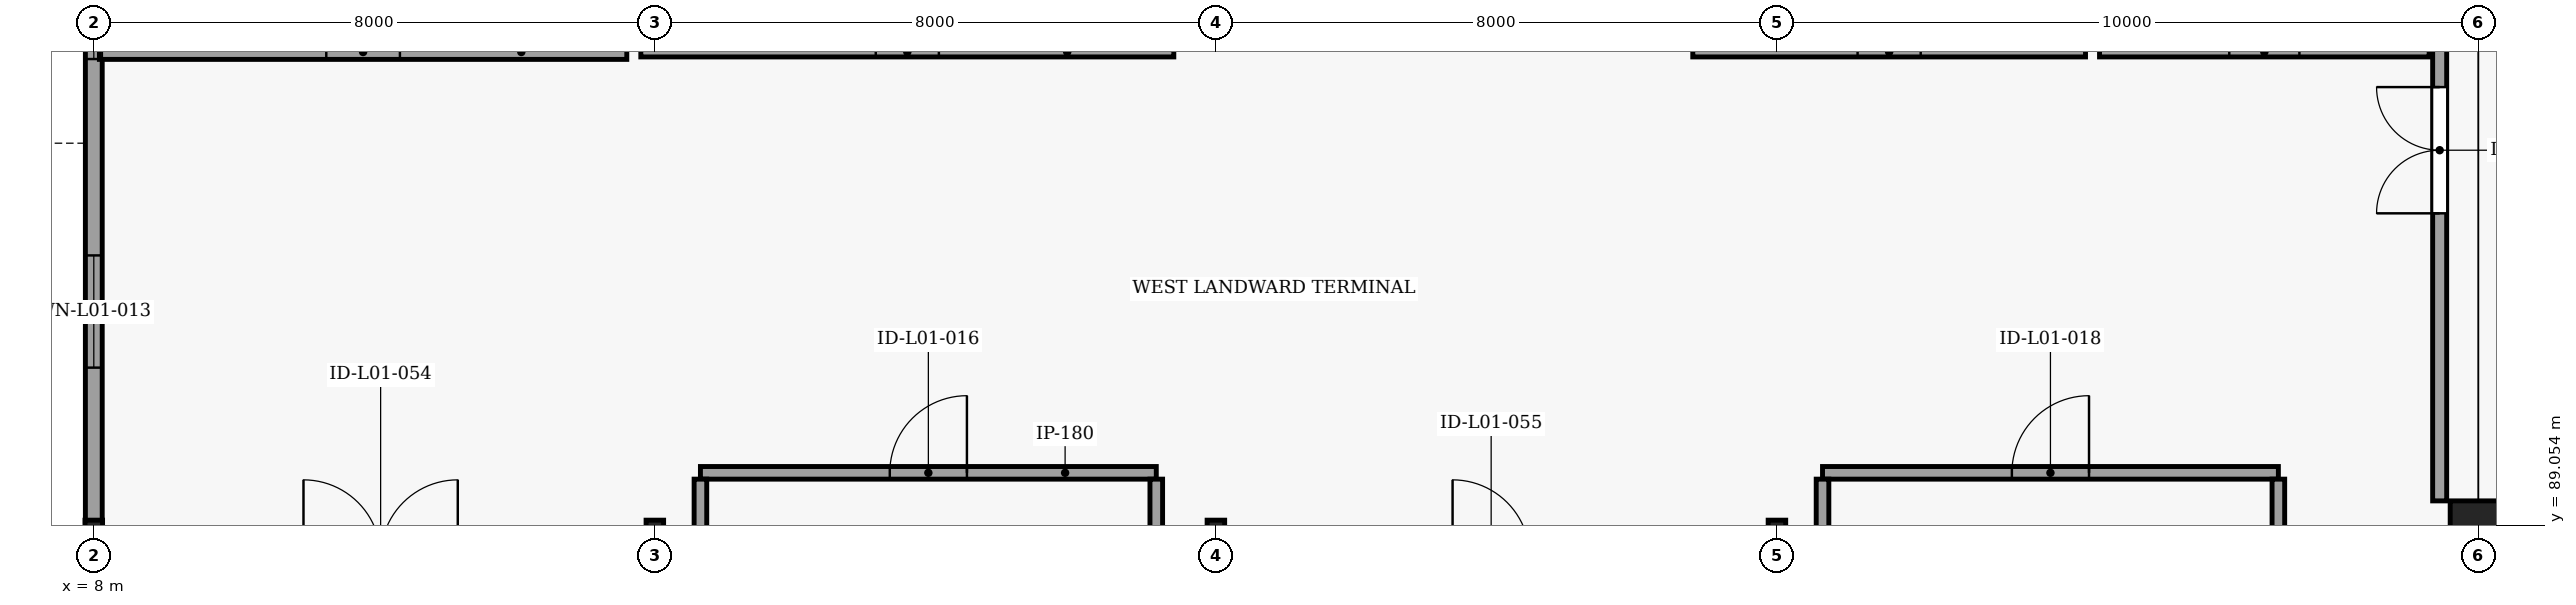
"""IFC4 building model, lengths in metres.
Left out: names, types, materials, properties, quantities, classifications, styles, units other than length and angle.
Written with IfcOpenShell. Run it as: python <this file> out.ifc"""

import sys

from ifc_helpers import new_model, si_unit, direction, frame, frame_2d, origin, origin_2d, place, context, subcontext, project, spatial, rectangle, hollow_rectangle, extrude, element, fill, save


model = new_model("IFC4")
c1 = context("Model", 3, precision=1e-05, world=origin(), true_north=direction((0.0, 1.0)))
c2 = subcontext(c1, "Body", "Model", "MODEL_VIEW")
j1 = project(units=[si_unit("LENGTHUNIT", "METRE"), si_unit("PLANEANGLEUNIT", "RADIAN")], contexts=[c1])
p1 = place(None, origin())
s1 = spatial("IfcSite", under=j1, at=p1, CompositionType="ELEMENT")
p2 = place(p1, origin())
s2 = spatial("IfcBuilding", under=s1, at=p2, CompositionType="ELEMENT")
p3 = place(p2, origin())
s3 = spatial("IfcBuildingStorey", under=s2, at=p3, CompositionType="ELEMENT", Elevation=0.0)
for number, where, z_axis, x_axis in (
    (1, (8.0, 89.0, -0.45), (0.0, 0.0, 1.0), (1.0, 0.0, 0.0)),
    (2, (16.0, 89.0, -0.45), (0.0, 0.0, 1.0), (1.0, 0.0, 0.0)),
    (3, (24.0, 89.0, -0.45), (0.0, 0.0, 1.0), (1.0, 0.0, 0.0)),
    (4, (32.0, 89.0, -0.45), (0.0, 0.0, 1.0), (1.0, 0.0, 0.0)),
):
    element("IfcColumn", number, at=place(p3, frame(where, z_axis=z_axis, x_axis=x_axis)), inside=s3, PredefinedType="COLUMN", context=c2, shape_type="SweptSolid", body=[
        extrude(hollow_rectangle(XDim=0.25, YDim=0.25, WallThickness=0.012, InnerFilletRadius=0.012, OuterFilletRadius=0.025, at=origin_2d()), origin(), (0.0, 0.0, 1.0), 5.57),
    ])
p4 = place(p3, frame((42.0, 89.0, -0.45), z_axis=(0.0, 0.0, 1.0), x_axis=(1.0, 0.0, 0.0)))
e5 = element("IfcColumn", 5, at=p4, inside=s3, PredefinedType="COLUMN", context=c2, shape_type="SweptSolid", body=[
    extrude(rectangle(XDim=0.8, YDim=0.8, at=origin_2d()), origin(), (0.0, 0.0, 1.0), 5.57),
])
p5 = place(p3, frame((8.0, 78.3, 0.0), z_axis=(0.0, 0.0, 1.0), x_axis=(0.0, 1.0, 0.0)))
e6 = element("IfcWall", 6, at=p5, inside=s3, PredefinedType="ELEMENTEDWALL", context=c2, shape_type="SweptSolid", body=[
    extrude(rectangle(XDim=10.822, YDim=0.24, at=frame_2d((5.411, 0.0))), origin(), (0.0, 0.0, 1.0), 4.694),
])
p6 = place(p5, frame((2.0, 0.0, 1.1)))
e7 = element("IfcOpeningElement", 7, at=p6, cuts=e6, PredefinedType="OPENING", context=c2, shape_type="SweptSolid", body=[
    extrude(rectangle(XDim=1.6, YDim=1.3, at=frame_2d((0.8, 0.65))), frame((0.0, 0.13, 0.0), z_axis=(0.0, -1.0, 0.0), x_axis=(1.0, 0.0, 0.0)), (0.0, 0.0, 1.0), 0.26),
])
p7 = place(p5, frame((6.4, 0.0, 1.1)))
e8 = element("IfcOpeningElement", 8, at=p7, cuts=e6, PredefinedType="OPENING", context=c2, shape_type="SweptSolid", body=[
    extrude(rectangle(XDim=1.55, YDim=1.35, at=frame_2d((0.775, 0.675))), frame((0.0, 0.13, 0.0), z_axis=(0.0, -1.0, 0.0), x_axis=(1.0, 0.0, 0.0)), (0.0, 0.0, 1.0), 0.26),
])
p8 = place(p3, frame((8.0, 89.11, 0.0), z_axis=(0.0, 0.0, 1.0), x_axis=(0.0, 1.0, 0.0)))
e9 = element("IfcWall", 9, at=p8, inside=s3, PredefinedType="ELEMENTEDWALL", context=c2, shape_type="SweptSolid", body=[
    extrude(rectangle(XDim=11.012, YDim=0.24, at=frame_2d((5.506, 0.0))), origin(), (0.0, 0.0, 1.0), 4.694),
])
p9 = place(p8, frame((2.19, 0.0, 1.1)))
e10 = element("IfcOpeningElement", 10, at=p9, cuts=e9, PredefinedType="OPENING", context=c2, shape_type="SweptSolid", body=[
    extrude(rectangle(XDim=1.6, YDim=1.3, at=frame_2d((0.8, 0.65))), frame((0.0, 0.13, 0.0), z_axis=(0.0, -1.0, 0.0), x_axis=(1.0, 0.0, 0.0)), (0.0, 0.0, 1.0), 0.26),
])
p10 = place(p8, frame((6.59, 0.0, 1.1)))
e11 = element("IfcOpeningElement", 11, at=p10, cuts=e9, PredefinedType="OPENING", context=c2, shape_type="SweptSolid", body=[
    extrude(rectangle(XDim=1.55, YDim=1.35, at=frame_2d((0.775, 0.675))), frame((0.0, 0.13, 0.0), z_axis=(0.0, -1.0, 0.0), x_axis=(1.0, 0.0, 0.0)), (0.0, 0.0, 1.0), 0.26),
])
p11 = place(p3, frame((16.65, 89.8, 0.0), z_axis=(0.0, 0.0, 1.0), x_axis=(1.0, 0.0, 0.0)))
e12 = element("IfcWall", 12, at=p11, inside=s3, PredefinedType="SOLIDWALL", context=c2, shape_type="SweptSolid", body=[
    extrude(rectangle(XDim=6.5, YDim=0.18, at=frame_2d((3.25, 0.0))), origin(), (0.0, 0.0, 1.0), 5.1),
])
p12 = place(p11, frame((2.7, 0.0, 0.0)))
e13 = element("IfcOpeningElement", 13, at=p12, cuts=e12, PredefinedType="OPENING", context=c2, shape_type="SweptSolid", body=[
    extrude(rectangle(XDim=1.1, YDim=2.2, at=frame_2d((0.55, 1.1))), frame((0.0, 0.1, 0.0), z_axis=(0.0, -1.0, 0.0), x_axis=(1.0, 0.0, 0.0)), (0.0, 0.0, 1.0), 0.2),
])
for number, where, z_axis, x_axis in (
    (14, (16.65, 87.2, 0.0), (0.0, 0.0, 1.0), (0.0, 1.0, 0.0)),
    (15, (23.15, 87.2, 0.0), (0.0, 0.0, 1.0), (0.0, 1.0, 0.0)),
):
    element("IfcWall", number, at=place(p3, frame(where, z_axis=z_axis, x_axis=x_axis)), inside=s3, PredefinedType="SOLIDWALL", context=c2, shape_type="SweptSolid", body=[
        extrude(rectangle(XDim=2.51, YDim=0.18, at=frame_2d((1.255, 0.0))), origin(), (0.0, 0.0, 1.0), 4.66),
    ])
p13 = place(p3, frame((32.65, 89.8, 0.0), z_axis=(0.0, 0.0, 1.0), x_axis=(1.0, 0.0, 0.0)))
e16 = element("IfcWall", 16, at=p13, inside=s3, PredefinedType="SOLIDWALL", context=c2, shape_type="SweptSolid", body=[
    extrude(rectangle(XDim=6.5, YDim=0.18, at=frame_2d((3.25, 0.0))), origin(), (0.0, 0.0, 1.0), 5.1),
])
p14 = place(p13, frame((2.7, 0.0, 0.0)))
e17 = element("IfcOpeningElement", 17, at=p14, cuts=e16, PredefinedType="OPENING", context=c2, shape_type="SweptSolid", body=[
    extrude(rectangle(XDim=1.1, YDim=2.2, at=frame_2d((0.55, 1.1))), frame((0.0, 0.1, 0.0), z_axis=(0.0, -1.0, 0.0), x_axis=(1.0, 0.0, 0.0)), (0.0, 0.0, 1.0), 0.2),
])
for number, where, z_axis, x_axis in (
    (18, (32.65, 87.2, 0.0), (0.0, 0.0, 1.0), (0.0, 1.0, 0.0)),
    (19, (39.15, 87.2, 0.0), (0.0, 0.0, 1.0), (0.0, 1.0, 0.0)),
):
    element("IfcWall", number, at=place(p3, frame(where, z_axis=z_axis, x_axis=x_axis)), inside=s3, PredefinedType="SOLIDWALL", context=c2, shape_type="SweptSolid", body=[
        extrude(rectangle(XDim=2.51, YDim=0.18, at=frame_2d((1.255, 0.0))), origin(), (0.0, 0.0, 1.0), 4.66),
    ])
p15 = place(p3, frame((41.45, 89.4, 0.0), z_axis=(0.0, 0.0, 1.0), x_axis=(0.0, 1.0, 0.0)))
e20 = element("IfcWall", 20, at=p15, inside=s3, PredefinedType="SOLIDWALL", context=c2, shape_type="SweptSolid", body=[
    extrude(rectangle(XDim=10.2, YDim=0.2, at=frame_2d((5.1, 0.0))), origin(), (0.0, 0.0, 1.0), 4.807),
])
p16 = place(p15, frame((4.1, 0.0, 0.0)))
e21 = element("IfcOpeningElement", 21, at=p16, cuts=e20, PredefinedType="OPENING", context=c2, shape_type="SweptSolid", body=[
    extrude(rectangle(XDim=1.8, YDim=2.2, at=frame_2d((0.9, 1.1))), frame((0.0, 0.11, 0.0), z_axis=(0.0, -1.0, 0.0), x_axis=(1.0, 0.0, 0.0)), (0.0, 0.0, 1.0), 0.22),
])
p17 = place(p3, frame((8.08, 95.8, 0.0), z_axis=(0.0, 0.0, 1.0), x_axis=(1.0, 0.0, 0.0)))
e22 = element("IfcWall", 22, at=p17, inside=s3, PredefinedType="SOLIDWALL", context=c2, shape_type="SweptSolid", body=[
    extrude(rectangle(XDim=7.52, YDim=0.21, at=frame_2d((3.76, 0.0))), origin(), (0.0, 0.0, 1.0), 5.05),
])
p18 = place(p17, frame((3.235, 0.0, 0.0)))
e23 = element("IfcOpeningElement", 23, at=p18, cuts=e22, PredefinedType="OPENING", context=c2, shape_type="SweptSolid", body=[
    extrude(rectangle(XDim=1.05, YDim=2.15, at=frame_2d((0.525, 1.075))), frame((0.0, 0.115, 0.0), z_axis=(0.0, -1.0, 0.0), x_axis=(1.0, 0.0, 0.0)), (0.0, 0.0, 1.0), 0.23),
])
p19 = place(p3, frame((15.8, 95.8, 0.0), z_axis=(0.0, 0.0, 1.0), x_axis=(1.0, 0.0, 0.0)))
e24 = element("IfcWall", 24, at=p19, inside=s3, PredefinedType="PARTITIONING", context=c2, shape_type="SweptSolid", body=[
    extrude(rectangle(XDim=7.6, YDim=0.14, at=frame_2d((3.8, 0.0))), origin(), (0.0, 0.0, 1.0), 4.696),
])
p20 = place(p19, frame((3.35, 0.0, 0.0)))
e25 = element("IfcOpeningElement", 25, at=p20, cuts=e24, PredefinedType="OPENING", context=c2, shape_type="SweptSolid", body=[
    extrude(rectangle(XDim=0.9, YDim=2.1, at=frame_2d((0.45, 1.05))), frame((0.0, 0.08, 0.0), z_axis=(0.0, -1.0, 0.0), x_axis=(1.0, 0.0, 0.0)), (0.0, 0.0, 1.0), 0.16),
])
p21 = place(p3, frame((30.8, 95.8, 0.0), z_axis=(0.0, 0.0, 1.0), x_axis=(1.0, 0.0, 0.0)))
e26 = element("IfcWall", 26, at=p21, inside=s3, PredefinedType="PARTITIONING", context=c2, shape_type="SweptSolid", body=[
    extrude(rectangle(XDim=5.6, YDim=0.14, at=frame_2d((2.8, 0.0))), origin(), (0.0, 0.0, 1.0), 4.703),
])
p22 = place(p21, frame((2.35, 0.0, 0.0)))
e27 = element("IfcOpeningElement", 27, at=p22, cuts=e26, PredefinedType="OPENING", context=c2, shape_type="SweptSolid", body=[
    extrude(rectangle(XDim=0.9, YDim=2.1, at=frame_2d((0.45, 1.05))), frame((0.0, 0.08, 0.0), z_axis=(0.0, -1.0, 0.0), x_axis=(1.0, 0.0, 0.0)), (0.0, 0.0, 1.0), 0.16),
])
p23 = place(p3, frame((36.6, 95.8, 0.0), z_axis=(0.0, 0.0, 1.0), x_axis=(1.0, 0.0, 0.0)))
e28 = element("IfcWall", 28, at=p23, inside=s3, PredefinedType="PARTITIONING", context=c2, shape_type="SweptSolid", body=[
    extrude(rectangle(XDim=4.7, YDim=0.14, at=frame_2d((2.35, 0.0))), origin(), (0.0, 0.0, 1.0), 5.1),
])
p24 = place(p23, frame((1.85, 0.0, 0.0)))
e29 = element("IfcOpeningElement", 29, at=p24, cuts=e28, PredefinedType="OPENING", context=c2, shape_type="SweptSolid", body=[
    extrude(rectangle(XDim=1.0, YDim=2.15, at=frame_2d((0.5, 1.075))), frame((0.0, 0.08, 0.0), z_axis=(0.0, -1.0, 0.0), x_axis=(1.0, 0.0, 0.0)), (0.0, 0.0, 1.0), 0.16),
])
p25 = place(p9, origin())
e30 = element("IfcWindow", 30, at=p25, inside=s3, PartitioningType="SINGLE_PANEL", PredefinedType="WINDOW", context=c2, shape_type="SweptSolid", body=[
    extrude(rectangle(XDim=1.6, YDim=1.3, at=frame_2d((0.8, 0.65))), frame((0.0, 0.03, 0.0), z_axis=(0.0, -1.0, 0.0), x_axis=(1.0, 0.0, 0.0)), (0.0, 0.0, 1.0), 0.06),
])
fill(e10, e30)
p26 = place(p10, origin())
e31 = element("IfcWindow", 31, at=p26, inside=s3, PartitioningType="SINGLE_PANEL", PredefinedType="WINDOW", context=c2, shape_type="SweptSolid", body=[
    extrude(rectangle(XDim=1.55, YDim=1.35, at=frame_2d((0.775, 0.675))), frame((0.0, 0.03, 0.0), z_axis=(0.0, -1.0, 0.0), x_axis=(1.0, 0.0, 0.0)), (0.0, 0.0, 1.0), 0.06),
])
fill(e11, e31)
p27 = place(p12, origin())
e32 = element("IfcDoor", 32, at=p27, inside=s3, OperationType="SINGLE_SWING_RIGHT", PredefinedType="DOOR", context=c2, shape_type="SweptSolid", body=[
    extrude(rectangle(XDim=1.1, YDim=2.2, at=frame_2d((0.55, 1.1))), frame((0.0, 0.025, 0.0), z_axis=(0.0, -1.0, 0.0), x_axis=(1.0, 0.0, 0.0)), (0.0, 0.0, 1.0), 0.05),
])
fill(e13, e32)
p28 = place(p14, origin())
e33 = element("IfcDoor", 33, at=p28, inside=s3, OperationType="SINGLE_SWING_RIGHT", PredefinedType="DOOR", context=c2, shape_type="SweptSolid", body=[
    extrude(rectangle(XDim=1.1, YDim=2.2, at=frame_2d((0.55, 1.1))), frame((0.0, 0.025, 0.0), z_axis=(0.0, -1.0, 0.0), x_axis=(1.0, 0.0, 0.0)), (0.0, 0.0, 1.0), 0.05),
])
fill(e17, e33)
p29 = place(p16, origin())
e34 = element("IfcDoor", 34, at=p29, inside=s3, OperationType="DOUBLE_DOOR_SINGLE_SWING", PredefinedType="DOOR", context=c2, shape_type="SweptSolid", body=[
    extrude(rectangle(XDim=1.8, YDim=2.2, at=frame_2d((0.9, 1.1))), frame((0.0, 0.025, 0.0), z_axis=(0.0, -1.0, 0.0), x_axis=(1.0, 0.0, 0.0)), (0.0, 0.0, 1.0), 0.05),
])
fill(e21, e34)
p30 = place(p18, origin())
e35 = element("IfcDoor", 35, at=p30, inside=s3, OperationType="SINGLE_SWING_RIGHT", PredefinedType="DOOR", context=c2, shape_type="SweptSolid", body=[
    extrude(rectangle(XDim=1.05, YDim=2.15, at=frame_2d((0.525, 1.075))), frame((0.0, 0.025, 0.0), z_axis=(0.0, -1.0, 0.0), x_axis=(1.0, 0.0, 0.0)), (0.0, 0.0, 1.0), 0.05),
])
fill(e23, e35)
p31 = place(p20, origin())
e36 = element("IfcDoor", 36, at=p31, inside=s3, OperationType="SINGLE_SWING_LEFT", PredefinedType="DOOR", context=c2, shape_type="SweptSolid", body=[
    extrude(rectangle(XDim=0.9, YDim=2.1, at=frame_2d((0.45, 1.05))), frame((0.0, 0.025, 0.0), z_axis=(0.0, -1.0, 0.0), x_axis=(1.0, 0.0, 0.0)), (0.0, 0.0, 1.0), 0.05),
])
fill(e25, e36)
p32 = place(p22, origin())
e37 = element("IfcDoor", 37, at=p32, inside=s3, OperationType="SINGLE_SWING_RIGHT", PredefinedType="DOOR", context=c2, shape_type="SweptSolid", body=[
    extrude(rectangle(XDim=0.9, YDim=2.1, at=frame_2d((0.45, 1.05))), frame((0.0, 0.025, 0.0), z_axis=(0.0, -1.0, 0.0), x_axis=(1.0, 0.0, 0.0)), (0.0, 0.0, 1.0), 0.05),
])
fill(e27, e37)
p33 = place(p24, origin())
e38 = element("IfcDoor", 38, at=p33, inside=s3, OperationType="SINGLE_SWING_LEFT", PredefinedType="DOOR", context=c2, shape_type="SweptSolid", body=[
    extrude(rectangle(XDim=1.0, YDim=2.15, at=frame_2d((0.5, 1.075))), frame((0.0, 0.025, 0.0), z_axis=(0.0, -1.0, 0.0), x_axis=(1.0, 0.0, 0.0)), (0.0, 0.0, 1.0), 0.05),
])
fill(e29, e38)
save(model, sys.argv[1])
